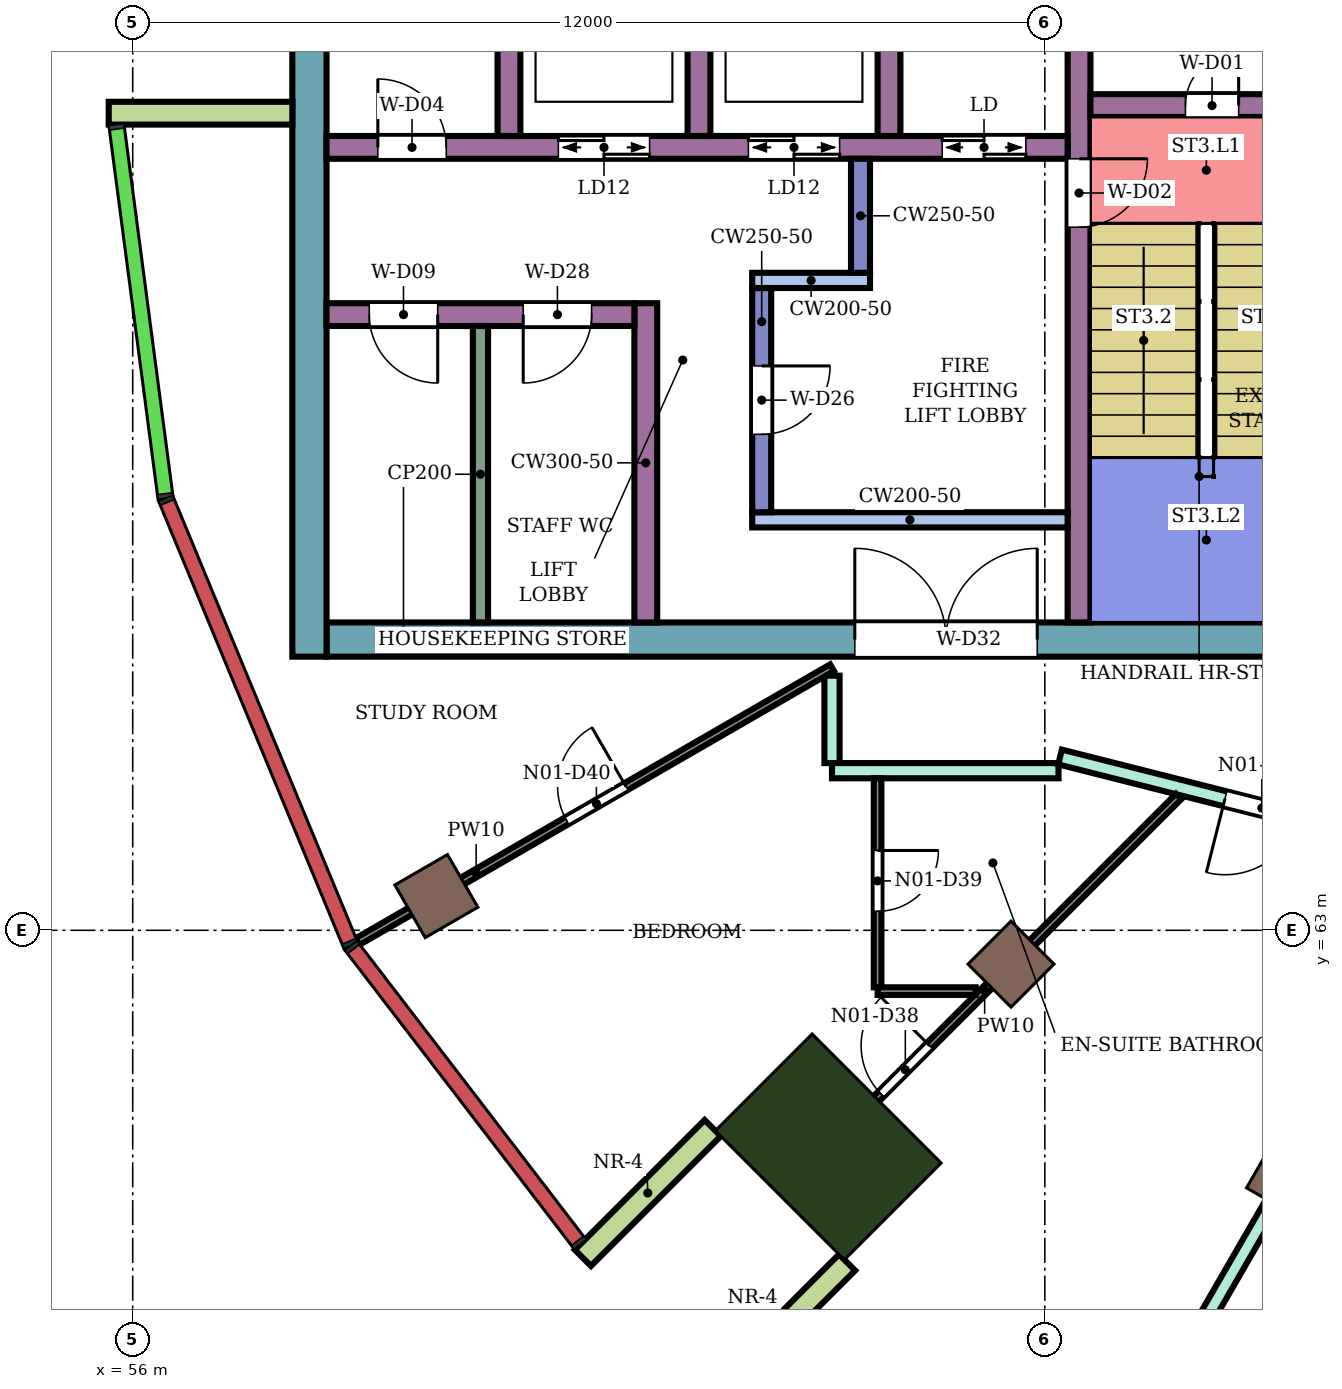
"""IFC4 building model, lengths in metres.
Left out: names, types, materials, properties, quantities, classifications, styles, units other than length and angle.
Written with IfcOpenShell. Run it as: python <this file> out.ifc"""

import sys

from ifc_helpers import new_model, si_unit, direction, frame, frame_2d, origin, origin_2d, place, context, subcontext, project, spatial, rectangle, extrude, element, fill, save


model = new_model("IFC4")
c1 = context("Model", 3, precision=1e-05, world=origin(), true_north=direction((0.0, 1.0)))
c2 = subcontext(c1, "Body", "Model", "MODEL_VIEW")
j1 = project(units=[si_unit("LENGTHUNIT", "METRE"), si_unit("PLANEANGLEUNIT", "RADIAN")], contexts=[c1])
p1 = place(None, origin())
s1 = spatial("IfcSite", under=j1, at=p1, CompositionType="ELEMENT")
p2 = place(p1, origin())
s2 = spatial("IfcBuilding", under=s1, at=p2, CompositionType="ELEMENT")
p3 = place(p2, frame((0.0, 0.0, 279.9)))
s3 = spatial("IfcBuildingStorey", under=s2, at=p3, CompositionType="ELEMENT", Elevation=279.9)
for number, where, z_axis, x_axis in (
    (1, (59.995, 63.45, 0.0), (0.0, 0.0, 1.0), (-0.866, -0.5, 0.0)),
    (2, (67.555, 62.555, 0.0), (0.0, 0.0, 1.0), (-0.707, -0.707, 0.0)),
    (3, (71.2, 59.758, 0.0), (0.0, 0.0, 1.0), (-0.5, -0.866, 0.0)),
):
    element("IfcColumn", number, at=place(p3, frame(where, z_axis=z_axis, x_axis=x_axis)), inside=s3, PredefinedType="COLUMN", context=c2, shape_type="SweptSolid", body=[
        extrude(rectangle(XDim=0.8, YDim=0.8, at=origin_2d()), origin(), (0.0, 0.0, 1.0), 4.2),
    ])
p4 = place(p3, frame((65.151, 60.151, 0.0), z_axis=(0.0, 0.0, 1.0), x_axis=(-0.707106781187, -0.707106781187, 0.0)))
e4 = element("IfcColumn", 4, at=p4, inside=s3, PredefinedType="COLUMN", context=c2, shape_type="SweptSolid", body=[
    extrude(rectangle(XDim=1.8, YDim=2.4, at=origin_2d()), origin(), (0.0, 0.0, 1.0), 4.2),
])
p5 = place(p3, frame((72.1, 66.825, 0.0), z_axis=(0.0, 0.0, 1.0), x_axis=(-1.0, 0.0, 0.0)))
e5 = element("IfcWall", 5, at=p5, inside=s3, PredefinedType="SHEAR", context=c2, shape_type="SweptSolid", body=[
    extrude(rectangle(XDim=13.55, YDim=0.45, at=frame_2d((6.775, 0.0))), origin(), (0.0, 0.0, 1.0), 3.88),
])
p6 = place(p5, frame((4.2, 0.0, 0.0)))
e6 = element("IfcOpeningElement", 6, at=p6, cuts=e5, PredefinedType="OPENING", context=c2, shape_type="SweptSolid", body=[
    extrude(rectangle(XDim=2.4, YDim=2.4, at=frame_2d((1.2, 1.2))), frame((0.0, 0.235, 0.0), z_axis=(0.0, -1.0, 0.0), x_axis=(1.0, 0.0, 0.0)), (0.0, 0.0, 1.0), 0.47),
])
p7 = place(p3, frame((58.325, 83.4, 0.0), z_axis=(0.0, 0.0, 1.0), x_axis=(0.0, -1.0, 0.0)))
e7 = element("IfcWall", 7, at=p7, inside=s3, PredefinedType="SHEAR", context=c2, shape_type="SweptSolid", body=[
    extrude(rectangle(XDim=16.8, YDim=0.45, at=frame_2d((8.4, 0.0))), origin(), (0.0, 0.0, 1.0), 3.88),
])
p8 = place(p3, frame((68.45, 75.0, 0.0), z_axis=(0.0, 0.0, 1.0), x_axis=(0.0, -1.0, 0.0)))
e8 = element("IfcWall", 8, at=p8, inside=s3, PredefinedType="SHEAR", context=c2, shape_type="SweptSolid", body=[
    extrude(rectangle(XDim=7.95, YDim=0.3, at=frame_2d((3.975, 0.0))), origin(), (0.0, 0.0, 1.0), 3.88),
])
p9 = place(p8, frame((1.85, 0.0, 0.0)))
e9 = element("IfcOpeningElement", 9, at=p9, cuts=e8, PredefinedType="OPENING", context=c2, shape_type="SweptSolid", body=[
    extrude(rectangle(XDim=0.9, YDim=2.1, at=frame_2d((0.45, 1.05))), frame((0.0, 0.16, 0.0), z_axis=(0.0, -1.0, 0.0), x_axis=(1.0, 0.0, 0.0)), (0.0, 0.0, 1.0), 0.32),
])
p10 = place(p3, frame((71.65, 73.85, 0.0), z_axis=(0.0, 0.0, 1.0), x_axis=(-1.0, 0.0, 0.0)))
e10 = element("IfcWall", 10, at=p10, inside=s3, PredefinedType="SHEAR", context=c2, shape_type="SweptSolid", body=[
    extrude(rectangle(XDim=3.05, YDim=0.3, at=frame_2d((1.525, 0.0))), origin(), (0.0, 0.0, 1.0), 3.88),
])
p11 = place(p10, frame((1.1, 0.0, 0.0)))
e11 = element("IfcOpeningElement", 11, at=p11, cuts=e10, PredefinedType="OPENING", context=c2, shape_type="SweptSolid", body=[
    extrude(rectangle(XDim=0.7, YDim=2.0, at=frame_2d((0.35, 1.0))), frame((0.0, 0.16, 0.0), z_axis=(0.0, -1.0, 0.0), x_axis=(1.0, 0.0, 0.0)), (0.0, 0.0, 1.0), 0.32),
])
p12 = place(p3, frame((68.3, 73.3, 0.0), z_axis=(0.0, 0.0, 1.0), x_axis=(-1.0, 0.0, 0.0)))
e12 = element("IfcWall", 12, at=p12, inside=s3, PredefinedType="SHEAR", context=c2, shape_type="SweptSolid", body=[
    extrude(rectangle(XDim=9.75, YDim=0.3, at=frame_2d((4.875, 0.0))), origin(), (0.0, 0.0, 1.0), 3.88),
])
p13 = place(p12, frame((0.55, 0.0, 0.0)))
e13 = element("IfcOpeningElement", 13, at=p13, cuts=e12, PredefinedType="OPENING", context=c2, shape_type="SweptSolid", body=[
    extrude(rectangle(XDim=1.1, YDim=2.1, at=frame_2d((0.55, 1.05))), frame((0.0, 0.16, 0.0), z_axis=(0.0, -1.0, 0.0), x_axis=(1.0, 0.0, 0.0)), (0.0, 0.0, 1.0), 0.32),
])
p14 = place(p12, frame((3.0, 0.0, 0.0)))
e14 = element("IfcOpeningElement", 14, at=p14, cuts=e12, PredefinedType="OPENING", context=c2, shape_type="SweptSolid", body=[
    extrude(rectangle(XDim=1.2, YDim=2.1, at=frame_2d((0.6, 1.05))), frame((0.0, 0.16, 0.0), z_axis=(0.0, -1.0, 0.0), x_axis=(1.0, 0.0, 0.0)), (0.0, 0.0, 1.0), 0.32),
])
p15 = place(p12, frame((5.5, 0.0, 0.0)))
e15 = element("IfcOpeningElement", 15, at=p15, cuts=e12, PredefinedType="OPENING", context=c2, shape_type="SweptSolid", body=[
    extrude(rectangle(XDim=1.2, YDim=2.1, at=frame_2d((0.6, 1.05))), frame((0.0, 0.16, 0.0), z_axis=(0.0, -1.0, 0.0), x_axis=(1.0, 0.0, 0.0)), (0.0, 0.0, 1.0), 0.32),
])
p16 = place(p12, frame((8.175, 0.0, 0.0)))
e16 = element("IfcOpeningElement", 16, at=p16, cuts=e12, PredefinedType="OPENING", context=c2, shape_type="SweptSolid", body=[
    extrude(rectangle(XDim=0.9, YDim=2.1, at=frame_2d((0.45, 1.05))), frame((0.0, 0.16, 0.0), z_axis=(0.0, -1.0, 0.0), x_axis=(1.0, 0.0, 0.0)), (0.0, 0.0, 1.0), 0.32),
])
for number, where, z_axis, x_axis in (
    (17, (65.95, 76.0, 0.0), (0.0, 0.0, 1.0), (0.0, -1.0, 0.0)),
    (18, (63.45, 76.0, 0.0), (0.0, 0.0, 1.0), (0.0, -1.0, 0.0)),
    (19, (60.95, 76.0, 0.0), (0.0, 0.0, 1.0), (0.0, -1.0, 0.0)),
):
    element("IfcWall", number, at=place(p3, frame(where, z_axis=z_axis, x_axis=x_axis)), inside=s3, PredefinedType="SHEAR", context=c2, shape_type="SweptSolid", body=[
        extrude(rectangle(XDim=2.55, YDim=0.3, at=frame_2d((1.275, 0.0))), origin(), (0.0, 0.0, 1.0), 3.88),
    ])
p17 = place(p3, frame((68.3, 68.4, 0.0), z_axis=(0.0, 0.0, 1.0), x_axis=(-1.0, 0.0, 0.0)))
e20 = element("IfcWall", 20, at=p17, inside=s3, PredefinedType="SHEAR", context=c2, shape_type="SweptSolid", body=[
    extrude(rectangle(XDim=4.15, YDim=0.2, at=frame_2d((2.075, 0.0))), origin(), (0.0, 0.0, 1.0), 3.88),
])
p18 = place(p3, frame((64.275, 71.45, 0.0), z_axis=(0.0, 0.0, 1.0), x_axis=(0.0, -1.0, 0.0)))
e21 = element("IfcWall", 21, at=p18, inside=s3, PredefinedType="SHEAR", context=c2, shape_type="SweptSolid", body=[
    extrude(rectangle(XDim=2.95, YDim=0.25, at=frame_2d((1.475, 0.0))), origin(), (0.0, 0.0, 1.0), 3.88),
])
p19 = place(p18, frame((1.025, 0.0, 0.0)))
e22 = element("IfcOpeningElement", 22, at=p19, cuts=e21, PredefinedType="OPENING", context=c2, shape_type="SweptSolid", body=[
    extrude(rectangle(XDim=0.9, YDim=2.1, at=frame_2d((0.45, 1.05))), frame((0.0, 0.135, 0.0), z_axis=(0.0, -1.0, 0.0), x_axis=(1.0, 0.0, 0.0)), (0.0, 0.0, 1.0), 0.27),
])
p20 = place(p3, frame((65.7, 71.55, 0.0), z_axis=(0.0, 0.0, 1.0), x_axis=(-1.0, 0.0, 0.0)))
e23 = element("IfcWall", 23, at=p20, inside=s3, PredefinedType="SHEAR", context=c2, shape_type="SweptSolid", body=[
    extrude(rectangle(XDim=1.55, YDim=0.2, at=frame_2d((0.775, 0.0))), origin(), (0.0, 0.0, 1.0), 3.88),
])
p21 = place(p3, frame((65.575, 73.15, 0.0), z_axis=(0.0, 0.0, 1.0), x_axis=(0.0, -1.0, 0.0)))
e24 = element("IfcWall", 24, at=p21, inside=s3, PredefinedType="SHEAR", context=c2, shape_type="SweptSolid", body=[
    extrude(rectangle(XDim=1.5, YDim=0.25, at=frame_2d((0.75, 0.0))), origin(), (0.0, 0.0, 1.0), 3.88),
])
p22 = place(p3, frame((62.75, 71.25, 0.0), z_axis=(0.0, 0.0, 1.0), x_axis=(0.0, -1.0, 0.0)))
e25 = element("IfcWall", 25, at=p22, inside=s3, PredefinedType="SHEAR", context=c2, shape_type="SweptSolid", body=[
    extrude(rectangle(XDim=4.2, YDim=0.3, at=frame_2d((2.1, 0.0))), origin(), (0.0, 0.0, 1.0), 3.88),
])
p23 = place(p3, frame((62.6, 71.1, 0.0), z_axis=(0.0, 0.0, 1.0), x_axis=(-1.0, 0.0, 0.0)))
e26 = element("IfcWall", 26, at=p23, inside=s3, PredefinedType="SHEAR", context=c2, shape_type="SweptSolid", body=[
    extrude(rectangle(XDim=4.05, YDim=0.3, at=frame_2d((2.025, 0.0))), origin(), (0.0, 0.0, 1.0), 3.88),
])
p24 = place(p23, frame((0.562, 0.0, 0.0)))
e27 = element("IfcOpeningElement", 27, at=p24, cuts=e26, PredefinedType="OPENING", context=c2, shape_type="SweptSolid", body=[
    extrude(rectangle(XDim=0.9, YDim=2.1, at=frame_2d((0.45, 1.05))), frame((0.0, 0.16, 0.0), z_axis=(0.0, -1.0, 0.0), x_axis=(1.0, 0.0, 0.0)), (0.0, 0.0, 1.0), 0.32),
])
p25 = place(p23, frame((2.587, 0.0, 0.0)))
e28 = element("IfcOpeningElement", 28, at=p25, cuts=e26, PredefinedType="OPENING", context=c2, shape_type="SweptSolid", body=[
    extrude(rectangle(XDim=0.9, YDim=2.1, at=frame_2d((0.45, 1.05))), frame((0.0, 0.16, 0.0), z_axis=(0.0, -1.0, 0.0), x_axis=(1.0, 0.0, 0.0)), (0.0, 0.0, 1.0), 0.32),
])
p26 = place(p3, frame((58.1, 73.75, 0.0), z_axis=(0.0, 0.0, 1.0), x_axis=(-1.0, 0.0, 0.0)))
e29 = element("IfcWall", 29, at=p26, inside=s3, PredefinedType="NOTDEFINED", context=c2, shape_type="SweptSolid", body=[
    extrude(rectangle(XDim=2.416, YDim=0.3, at=frame_2d((1.208, 0.0))), origin(), (0.0, 0.0, 1.0), 4.2),
])
for number, where, z_axis, x_axis in (
    (30, (63.63, 60.398, 0.0), (0.0, 0.0, 1.0), (-0.707, -0.707, 0.0)),
    (31, (65.398, 58.63, 0.0), (0.0, 0.0, 1.0), (-0.707, -0.707, 0.0)),
):
    element("IfcWall", number, at=place(p3, frame(where, z_axis=z_axis, x_axis=x_axis)), inside=s3, PredefinedType="NOTDEFINED", context=c2, shape_type="SweptSolid", body=[
        extrude(rectangle(XDim=2.416, YDim=0.3, at=frame_2d((1.208, 0.0))), origin(), (0.0, 0.0, 1.0), 4.2),
    ])
p27 = place(p3, frame((65.2, 65.2, 0.0), z_axis=(0.0, 0.0, 1.0), x_axis=(0.0, 1.0, 0.0)))
e32 = element("IfcWall", 32, at=p27, inside=s3, PredefinedType="PARTITIONING", context=c2, shape_type="SweptSolid", body=[
    extrude(rectangle(XDim=1.15, YDim=0.2, at=frame_2d((0.575, 0.0))), origin(), (0.0, 0.0, 1.0), 3.75),
])
p28 = place(p3, frame((65.2, 65.1, 0.0), z_axis=(0.0, 0.0, 1.0), x_axis=(1.0, 0.0, 0.0)))
e33 = element("IfcWall", 33, at=p28, inside=s3, PredefinedType="PARTITIONING", context=c2, shape_type="SweptSolid", body=[
    extrude(rectangle(XDim=2.98, YDim=0.2, at=frame_2d((1.49, 0.0))), origin(), (0.0, 0.0, 1.0), 3.75),
])
p29 = place(p3, frame((67.848, 53.959, 0.0), z_axis=(0.0, 0.0, 1.0), x_axis=(0.500121565392, 0.865955206595, 0.0)))
e34 = element("IfcWall", 34, at=p29, inside=s3, PredefinedType="PARTITIONING", context=c2, shape_type="SweptSolid", body=[
    extrude(rectangle(XDim=11.366, YDim=0.2, at=frame_2d((5.683, 0.0))), origin(), (0.0, 0.0, 1.0), 3.75),
])
p30 = place(p3, frame((68.2, 65.28, 0.0), z_axis=(0.0, 0.0, 1.0), x_axis=(0.969440802773, -0.24532535523, 0.0)))
e35 = element("IfcWall", 35, at=p30, inside=s3, PredefinedType="PARTITIONING", context=c2, shape_type="SweptSolid", body=[
    extrude(rectangle(XDim=5.928, YDim=0.2, at=frame_2d((2.964, 0.0))), origin(), (0.0, 0.0, 1.0), 3.75),
])
p31 = place(p30, frame((2.239, 0.0, 0.0)))
e36 = element("IfcOpeningElement", 36, at=p31, cuts=e35, PredefinedType="OPENING", context=c2, shape_type="SweptSolid", body=[
    extrude(rectangle(XDim=1.0, YDim=2.1, at=frame_2d((0.5, 1.05))), frame((0.0, 0.11, 0.0), z_axis=(0.0, -1.0, 0.0), x_axis=(1.0, 0.0, 0.0)), (0.0, 0.0, 1.0), 0.22),
])
p32 = place(p3, frame((58.958, 62.851, 0.0), z_axis=(0.0, 0.0, 1.0), x_axis=(0.866044015472, 0.499967762227, 0.0)))
e37 = element("IfcWall", 37, at=p32, inside=s3, PredefinedType="PARTITIONING", context=c2, shape_type="SweptSolid", body=[
    extrude(rectangle(XDim=7.208, YDim=0.1, at=frame_2d((3.604, 0.0))), origin(), (0.0, 0.0, 1.0), 3.75),
])
p33 = place(p32, frame((3.179, 0.0, 0.0)))
e38 = element("IfcOpeningElement", 38, at=p33, cuts=e37, PredefinedType="OPENING", context=c2, shape_type="SweptSolid", body=[
    extrude(rectangle(XDim=0.9, YDim=2.1, at=frame_2d((0.45, 1.05))), frame((0.0, 0.06, 0.0), z_axis=(0.0, -1.0, 0.0), x_axis=(1.0, 0.0, 0.0)), (0.0, 0.0, 1.0), 0.12),
])
p34 = place(p3, frame((64.656, 59.656, 0.0), z_axis=(0.0, 0.0, 1.0), x_axis=(0.707106781187, 0.707106781187, 0.0)))
e39 = element("IfcWall", 39, at=p34, inside=s3, PredefinedType="PARTITIONING", context=c2, shape_type="SweptSolid", body=[
    extrude(rectangle(XDim=7.22, YDim=0.1, at=frame_2d((3.61, 0.0))), origin(), (0.0, 0.0, 1.0), 3.75),
])
p35 = place(p34, frame((1.684, 0.0, 0.0)))
e40 = element("IfcOpeningElement", 40, at=p35, cuts=e39, PredefinedType="OPENING", context=c2, shape_type="SweptSolid", body=[
    extrude(rectangle(XDim=0.9, YDim=2.1, at=frame_2d((0.45, 1.05))), frame((0.0, 0.06, 0.0), z_axis=(0.0, -1.0, 0.0), x_axis=(1.0, 0.0, 0.0)), (0.0, 0.0, 1.0), 0.12),
])
p36 = place(p3, frame((65.8, 62.25, 0.0), z_axis=(0.0, 0.0, 1.0), x_axis=(0.0, 1.0, 0.0)))
e41 = element("IfcWall", 41, at=p36, inside=s3, PredefinedType="PARTITIONING", context=c2, shape_type="SweptSolid", body=[
    extrude(rectangle(XDim=2.75, YDim=0.1, at=frame_2d((1.375, 0.0))), origin(), (0.0, 0.0, 1.0), 3.75),
])
p37 = place(p36, frame((1.0, 0.0, 0.0)))
e42 = element("IfcOpeningElement", 42, at=p37, cuts=e41, PredefinedType="OPENING", context=c2, shape_type="SweptSolid", body=[
    extrude(rectangle(XDim=0.8, YDim=2.1, at=frame_2d((0.4, 1.05))), frame((0.0, 0.06, 0.0), z_axis=(0.0, -1.0, 0.0), x_axis=(1.0, 0.0, 0.0)), (0.0, 0.0, 1.0), 0.12),
])
p38 = place(p3, frame((65.8, 62.2, 0.0), z_axis=(0.0, 0.0, 1.0), x_axis=(1.0, 0.0, 0.0)))
e43 = element("IfcWall", 43, at=p38, inside=s3, PredefinedType="PARTITIONING", context=c2, shape_type="SweptSolid", body=[
    extrude(rectangle(XDim=1.29, YDim=0.1, at=frame_2d((0.645, 0.0))), origin(), (0.0, 0.0, 1.0), 3.75),
])
p39 = place(p3, frame((60.575, 70.95, 0.0), z_axis=(0.0, 0.0, 1.0), x_axis=(0.0, -1.0, 0.0)))
e44 = element("IfcWall", 44, at=p39, inside=s3, PredefinedType="PARTITIONING", context=c2, shape_type="SweptSolid", body=[
    extrude(rectangle(XDim=3.9, YDim=0.2, at=frame_2d((1.95, 0.0))), origin(), (0.0, 0.0, 1.0), 3.88),
])
p40 = place(p31, frame((1.0, 0.0, 0.0), z_axis=(0.0, 0.0, 1.0), x_axis=(-1.0, 0.0, 0.0)))
e45 = element("IfcDoor", 45, at=p40, inside=s3, OperationType="SINGLE_SWING_RIGHT", PredefinedType="DOOR", context=c2, shape_type="SweptSolid", body=[
    extrude(rectangle(XDim=1.0, YDim=2.1, at=frame_2d((0.5, 1.05))), frame((0.0, 0.025, 0.0), z_axis=(0.0, -1.0, 0.0), x_axis=(1.0, 0.0, 0.0)), (0.0, 0.0, 1.0), 0.05),
])
fill(e36, e45)
p41 = place(p35, origin())
e46 = element("IfcDoor", 46, at=p41, inside=s3, OperationType="SINGLE_SWING_RIGHT", PredefinedType="DOOR", context=c2, shape_type="SweptSolid", body=[
    extrude(rectangle(XDim=0.9, YDim=2.1, at=frame_2d((0.45, 1.05))), frame((0.0, 0.025, 0.0), z_axis=(0.0, -1.0, 0.0), x_axis=(1.0, 0.0, 0.0)), (0.0, 0.0, 1.0), 0.05),
])
fill(e40, e46)
p42 = place(p37, frame((0.8, 0.0, 0.0), z_axis=(0.0, 0.0, 1.0), x_axis=(-1.0, 0.0, 0.0)))
e47 = element("IfcDoor", 47, at=p42, inside=s3, OperationType="SINGLE_SWING_LEFT", PredefinedType="DOOR", context=c2, shape_type="SweptSolid", body=[
    extrude(rectangle(XDim=0.8, YDim=2.1, at=frame_2d((0.4, 1.05))), frame((0.0, 0.025, 0.0), z_axis=(0.0, -1.0, 0.0), x_axis=(1.0, 0.0, 0.0)), (0.0, 0.0, 1.0), 0.05),
])
fill(e42, e47)
p43 = place(p33, origin())
e48 = element("IfcDoor", 48, at=p43, inside=s3, OperationType="SINGLE_SWING_RIGHT", PredefinedType="DOOR", context=c2, shape_type="SweptSolid", body=[
    extrude(rectangle(XDim=0.9, YDim=2.1, at=frame_2d((0.45, 1.05))), frame((0.0, 0.025, 0.0), z_axis=(0.0, -1.0, 0.0), x_axis=(1.0, 0.0, 0.0)), (0.0, 0.0, 1.0), 0.05),
])
fill(e38, e48)
p44 = place(p11, frame((0.7, 0.0, 0.0), z_axis=(0.0, 0.0, 1.0), x_axis=(-1.0, 0.0, 0.0)))
e49 = element("IfcDoor", 49, at=p44, inside=s3, OperationType="SINGLE_SWING_RIGHT", PredefinedType="DOOR", context=c2, shape_type="SweptSolid", body=[
    extrude(rectangle(XDim=0.7, YDim=2.0, at=frame_2d((0.35, 1.0))), frame((0.0, 0.025, 0.0), z_axis=(0.0, -1.0, 0.0), x_axis=(1.0, 0.0, 0.0)), (0.0, 0.0, 1.0), 0.05),
])
fill(e11, e49)
p45 = place(p9, origin())
e50 = element("IfcDoor", 50, at=p45, inside=s3, OperationType="SINGLE_SWING_LEFT", PredefinedType="DOOR", context=c2, shape_type="SweptSolid", body=[
    extrude(rectangle(XDim=0.9, YDim=2.1, at=frame_2d((0.45, 1.05))), frame((0.0, 0.025, 0.0), z_axis=(0.0, -1.0, 0.0), x_axis=(1.0, 0.0, 0.0)), (0.0, 0.0, 1.0), 0.05),
])
fill(e9, e50)
p46 = place(p13, origin())
e51 = element("IfcDoor", 51, at=p46, inside=s3, OperationType="DOUBLE_DOOR_SLIDING", PredefinedType="DOOR", context=c2, shape_type="SweptSolid", body=[
    extrude(rectangle(XDim=1.1, YDim=2.1, at=frame_2d((0.55, 1.05))), frame((0.0, 0.025, 0.0), z_axis=(0.0, -1.0, 0.0), x_axis=(1.0, 0.0, 0.0)), (0.0, 0.0, 1.0), 0.05),
])
fill(e13, e51)
p47 = place(p14, origin())
e52 = element("IfcDoor", 52, at=p47, inside=s3, OperationType="DOUBLE_DOOR_SLIDING", PredefinedType="DOOR", context=c2, shape_type="SweptSolid", body=[
    extrude(rectangle(XDim=1.2, YDim=2.1, at=frame_2d((0.6, 1.05))), frame((0.0, 0.025, 0.0), z_axis=(0.0, -1.0, 0.0), x_axis=(1.0, 0.0, 0.0)), (0.0, 0.0, 1.0), 0.05),
])
fill(e14, e52)
p48 = place(p15, origin())
e53 = element("IfcDoor", 53, at=p48, inside=s3, OperationType="DOUBLE_DOOR_SLIDING", PredefinedType="DOOR", context=c2, shape_type="SweptSolid", body=[
    extrude(rectangle(XDim=1.2, YDim=2.1, at=frame_2d((0.6, 1.05))), frame((0.0, 0.025, 0.0), z_axis=(0.0, -1.0, 0.0), x_axis=(1.0, 0.0, 0.0)), (0.0, 0.0, 1.0), 0.05),
])
fill(e15, e53)
p49 = place(p16, frame((0.9, 0.0, 0.0), z_axis=(0.0, 0.0, 1.0), x_axis=(-1.0, 0.0, 0.0)))
e54 = element("IfcDoor", 54, at=p49, inside=s3, OperationType="SINGLE_SWING_LEFT", PredefinedType="DOOR", context=c2, shape_type="SweptSolid", body=[
    extrude(rectangle(XDim=0.9, YDim=2.1, at=frame_2d((0.45, 1.05))), frame((0.0, 0.025, 0.0), z_axis=(0.0, -1.0, 0.0), x_axis=(1.0, 0.0, 0.0)), (0.0, 0.0, 1.0), 0.05),
])
fill(e16, e54)
p50 = place(p19, origin())
e55 = element("IfcDoor", 55, at=p50, inside=s3, OperationType="SINGLE_SWING_LEFT", PredefinedType="DOOR", context=c2, shape_type="SweptSolid", body=[
    extrude(rectangle(XDim=0.9, YDim=2.1, at=frame_2d((0.45, 1.05))), frame((0.0, 0.025, 0.0), z_axis=(0.0, -1.0, 0.0), x_axis=(1.0, 0.0, 0.0)), (0.0, 0.0, 1.0), 0.05),
])
fill(e22, e55)
p51 = place(p24, origin())
e56 = element("IfcDoor", 56, at=p51, inside=s3, OperationType="SINGLE_SWING_RIGHT", PredefinedType="DOOR", context=c2, shape_type="SweptSolid", body=[
    extrude(rectangle(XDim=0.9, YDim=2.1, at=frame_2d((0.45, 1.05))), frame((0.0, 0.025, 0.0), z_axis=(0.0, -1.0, 0.0), x_axis=(1.0, 0.0, 0.0)), (0.0, 0.0, 1.0), 0.05),
])
fill(e27, e56)
p52 = place(p25, origin())
e57 = element("IfcDoor", 57, at=p52, inside=s3, OperationType="SINGLE_SWING_LEFT", PredefinedType="DOOR", context=c2, shape_type="SweptSolid", body=[
    extrude(rectangle(XDim=0.9, YDim=2.1, at=frame_2d((0.45, 1.05))), frame((0.0, 0.025, 0.0), z_axis=(0.0, -1.0, 0.0), x_axis=(1.0, 0.0, 0.0)), (0.0, 0.0, 1.0), 0.05),
])
fill(e28, e57)
p53 = place(p6, frame((2.4, 0.0, 0.0), z_axis=(0.0, 0.0, 1.0), x_axis=(-1.0, 0.0, 0.0)))
e58 = element("IfcDoor", 58, at=p53, inside=s3, OperationType="DOUBLE_DOOR_SINGLE_SWING", PredefinedType="DOOR", context=c2, shape_type="SweptSolid", body=[
    extrude(rectangle(XDim=2.4, YDim=2.4, at=frame_2d((1.2, 1.2))), frame((0.0, 0.025, 0.0), z_axis=(0.0, -1.0, 0.0), x_axis=(1.0, 0.0, 0.0)), (0.0, 0.0, 1.0), 0.05),
])
fill(e6, e58)
save(model, sys.argv[1])
